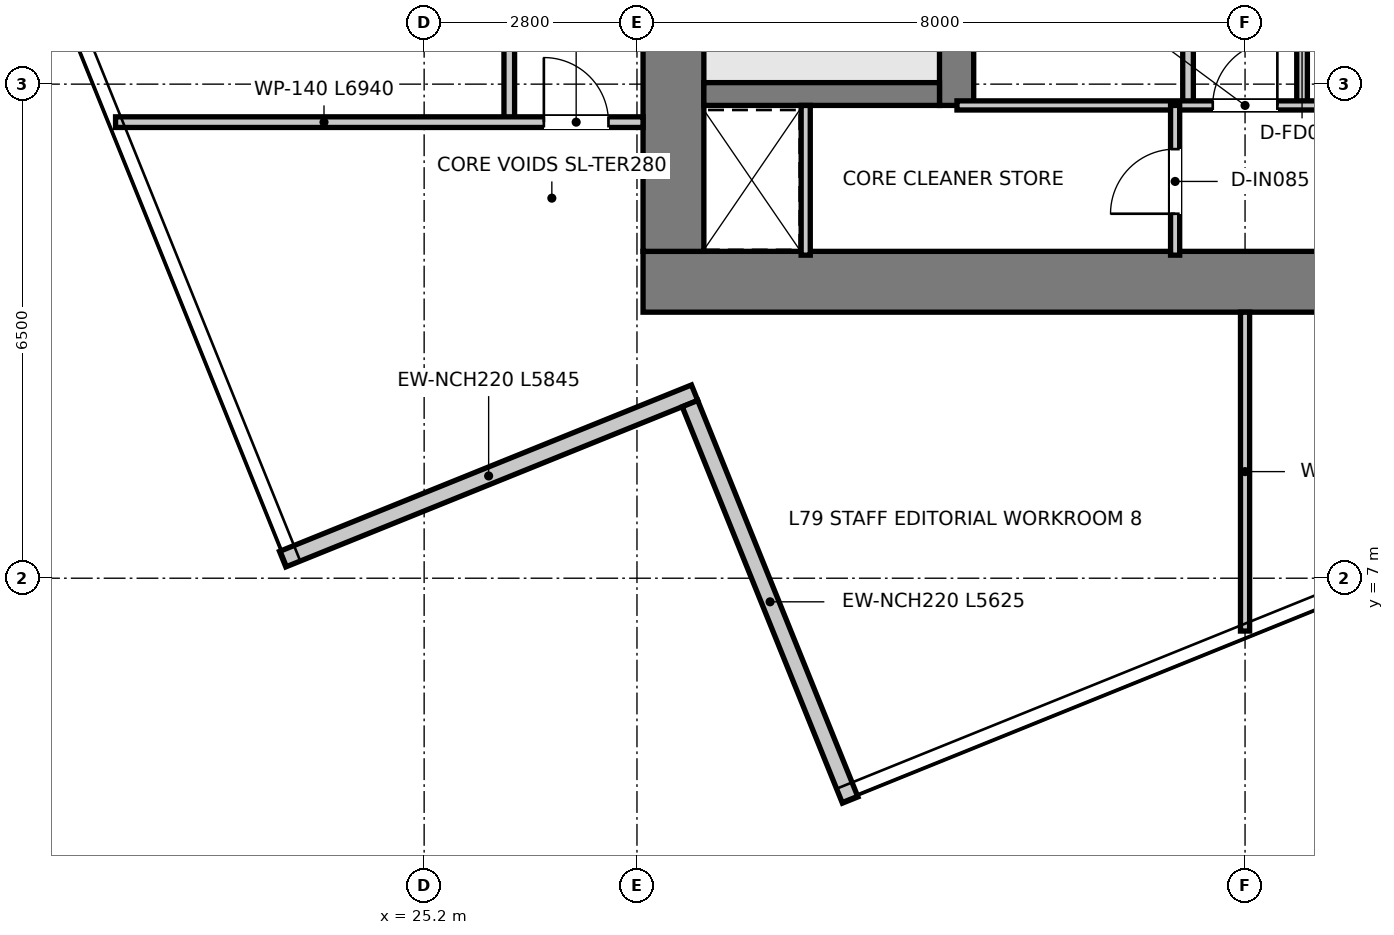
"""IFC4 building model, lengths in metres.
Left out: names, types, materials, properties, quantities, classifications, styles, units other than length and angle.
Written with IfcOpenShell. Run it as: python <this file> out.ifc"""

import sys

from ifc_helpers import new_model, si_unit, direction, frame, frame_2d, origin, place, context, subcontext, project, spatial, rectangle, extrude, element, fill, save


model = new_model("IFC4")
c1 = context("Model", 3, precision=1e-05, world=origin(), true_north=direction((0.0, 1.0)))
c2 = subcontext(c1, "Body", "Model", "MODEL_VIEW")
j1 = project(units=[si_unit("LENGTHUNIT", "METRE"), si_unit("PLANEANGLEUNIT", "RADIAN")], contexts=[c1])
p1 = place(None, origin())
s1 = spatial("IfcSite", under=j1, at=p1, CompositionType="ELEMENT")
p2 = place(p1, origin())
s2 = spatial("IfcBuilding", under=s1, at=p2, CompositionType="ELEMENT")
p3 = place(p2, frame((0.0, 0.0, 323.75)))
s3 = spatial("IfcBuildingStorey", under=s2, at=p3, CompositionType="ELEMENT", Elevation=323.75)
p4 = place(p3, frame((28.08, 10.9, 0.0), z_axis=(0.0, 0.0, 1.0), x_axis=(1.0, 0.0, 0.0)))
e1 = element("IfcWall", 1, at=p4, inside=s3, PredefinedType="SHEAR", context=c2, shape_type="SweptSolid", body=[
    extrude(rectangle(XDim=15.84, YDim=0.8, at=frame_2d((7.92, 0.0))), origin(), (0.0, 0.0, 1.0), 3.95),
])
p5 = place(p3, frame((28.48, 11.3, 0.0), z_axis=(0.0, 0.0, 1.0), x_axis=(0.0, 1.0, 0.0)))
e2 = element("IfcWall", 2, at=p5, inside=s3, PredefinedType="SHEAR", context=c2, shape_type="SweptSolid", body=[
    extrude(rectangle(XDim=14.7, YDim=0.8, at=frame_2d((7.35, 0.0))), origin(), (0.0, 0.0, 1.0), 3.95),
])
p6 = place(p3, frame((32.205, 13.22, 0.0), z_axis=(0.0, 0.0, 1.0), x_axis=(0.0, 1.0, 0.0)))
e3 = element("IfcWall", 3, at=p6, inside=s3, PredefinedType="SHEAR", context=c2, shape_type="SweptSolid", body=[
    extrude(rectangle(XDim=12.78, YDim=0.45, at=frame_2d((6.39, 0.0))), origin(), (0.0, 0.0, 1.0), 3.95),
])
p7 = place(p6, frame((10.58, 0.0, 0.0)))
e4 = element("IfcOpeningElement", 4, at=p7, cuts=e3, PredefinedType="OPENING", context=c2, shape_type="SweptSolid", body=[
    extrude(rectangle(XDim=1.1, YDim=2.15, at=frame_2d((0.55, 1.075))), frame((0.0, 0.235, 0.0), z_axis=(0.0, -1.0, 0.0), x_axis=(1.0, 0.0, 0.0)), (0.0, 0.0, 1.0), 0.47),
])
p8 = place(p3, frame((28.88, 13.37, 0.0), z_axis=(0.0, 0.0, 1.0), x_axis=(1.0, 0.0, 0.0)))
e5 = element("IfcWall", 5, at=p8, inside=s3, PredefinedType="SHEAR", context=c2, shape_type="SweptSolid", body=[
    extrude(rectangle(XDim=3.1, YDim=0.3, at=frame_2d((1.55, 0.0))), origin(), (0.0, 0.0, 1.0), 3.95),
])
p9 = place(p3, frame((23.339, 7.251, 0.0), z_axis=(0.0, 0.0, 1.0), x_axis=(0.927177676614, 0.374621884023, 0.0)))
e6 = element("IfcWall", 6, at=p9, inside=s3, PredefinedType="ELEMENTEDWALL", context=c2, shape_type="SweptSolid", body=[
    extrude(rectangle(XDim=5.845, YDim=0.22, at=frame_2d((2.922, 0.0))), origin(), (0.0, 0.0, 1.0), 3.67),
])
p10 = place(p3, frame((28.698, 9.297, 0.0), z_axis=(0.0, 0.0, 1.0), x_axis=(0.374613748588, -0.927180963658, 0.0)))
e7 = element("IfcWall", 7, at=p10, inside=s3, PredefinedType="ELEMENTEDWALL", context=c2, shape_type="SweptSolid", body=[
    extrude(rectangle(XDim=5.625, YDim=0.22, at=frame_2d((2.812, 0.0))), origin(), (0.0, 0.0, 1.0), 3.67),
])
p11 = place(p3, frame((35.25, 13.22, 0.0), z_axis=(0.0, 0.0, 1.0), x_axis=(0.0, 1.0, 0.0)))
e8 = element("IfcWall", 8, at=p11, inside=s3, PredefinedType="PARTITIONING", context=c2, shape_type="SweptSolid", body=[
    extrude(rectangle(XDim=4.56, YDim=0.14, at=frame_2d((2.28, 0.0))), origin(), (0.0, 0.0, 1.0), 3.67),
])
p12 = place(p11, frame((1.93, 0.0, 0.0)))
e9 = element("IfcOpeningElement", 9, at=p12, cuts=e8, PredefinedType="OPENING", context=c2, shape_type="SweptSolid", body=[
    extrude(rectangle(XDim=0.9, YDim=2.1, at=frame_2d((0.45, 1.05))), frame((0.0, 0.08, 0.0), z_axis=(0.0, -1.0, 0.0), x_axis=(1.0, 0.0, 0.0)), (0.0, 0.0, 1.0), 0.16),
])
p13 = place(p3, frame((36.75, 13.22, 0.0), z_axis=(0.0, 0.0, 1.0), x_axis=(0.0, 1.0, 0.0)))
e10 = element("IfcWall", 10, at=p13, inside=s3, PredefinedType="PARTITIONING", context=c2, shape_type="SweptSolid", body=[
    extrude(rectangle(XDim=4.56, YDim=0.14, at=frame_2d((2.28, 0.0))), origin(), (0.0, 0.0, 1.0), 3.67),
])
p14 = place(p13, frame((1.93, 0.0, 0.0)))
e11 = element("IfcOpeningElement", 11, at=p14, cuts=e10, PredefinedType="OPENING", context=c2, shape_type="SweptSolid", body=[
    extrude(rectangle(XDim=0.9, YDim=2.1, at=frame_2d((0.45, 1.05))), frame((0.0, 0.08, 0.0), z_axis=(0.0, -1.0, 0.0), x_axis=(1.0, 0.0, 0.0)), (0.0, 0.0, 1.0), 0.16),
])
p15 = place(p3, frame((30.22, 11.25, 0.0), z_axis=(0.0, 0.0, 1.0), x_axis=(0.0, 1.0, 0.0)))
e12 = element("IfcWall", 12, at=p15, inside=s3, PredefinedType="PARTITIONING", context=c2, shape_type="SweptSolid", body=[
    extrude(rectangle(XDim=1.97, YDim=0.12, at=frame_2d((0.985, 0.0))), origin(), (0.0, 0.0, 1.0), 3.67),
])
p16 = place(p3, frame((32.21, 13.22, 0.0), z_axis=(0.0, 0.0, 1.0), x_axis=(1.0, 0.0, 0.0)))
e13 = element("IfcWall", 13, at=p16, inside=s3, PredefinedType="PARTITIONING", context=c2, shape_type="SweptSolid", body=[
    extrude(rectangle(XDim=7.58, YDim=0.12, at=frame_2d((3.79, 0.0))), origin(), (0.0, 0.0, 1.0), 3.67),
])
p17 = place(p16, frame((3.365, 0.0, 0.0)))
e14 = element("IfcOpeningElement", 14, at=p17, cuts=e13, PredefinedType="OPENING", context=c2, shape_type="SweptSolid", body=[
    extrude(rectangle(XDim=0.85, YDim=2.1, at=frame_2d((0.425, 1.05))), frame((0.0, 0.07, 0.0), z_axis=(0.0, -1.0, 0.0), x_axis=(1.0, 0.0, 0.0)), (0.0, 0.0, 1.0), 0.14),
])
p18 = place(p3, frame((35.08, 11.25, 0.0), z_axis=(0.0, 0.0, 1.0), x_axis=(0.0, 1.0, 0.0)))
e15 = element("IfcWall", 15, at=p18, inside=s3, PredefinedType="PARTITIONING", context=c2, shape_type="SweptSolid", body=[
    extrude(rectangle(XDim=1.97, YDim=0.12, at=frame_2d((0.985, 0.0))), origin(), (0.0, 0.0, 1.0), 3.67),
])
p19 = place(p18, frame((0.545, 0.0, 0.0)))
e16 = element("IfcOpeningElement", 16, at=p19, cuts=e15, PredefinedType="OPENING", context=c2, shape_type="SweptSolid", body=[
    extrude(rectangle(XDim=0.85, YDim=2.1, at=frame_2d((0.425, 1.05))), frame((0.0, 0.07, 0.0), z_axis=(0.0, -1.0, 0.0), x_axis=(1.0, 0.0, 0.0)), (0.0, 0.0, 1.0), 0.14),
])
p20 = place(p3, frame((26.32, 13.0, 0.0), z_axis=(0.0, 0.0, 1.0), x_axis=(0.0, 1.0, 0.0)))
e17 = element("IfcWall", 17, at=p20, inside=s3, PredefinedType="PARTITIONING", context=c2, shape_type="SweptSolid", body=[
    extrude(rectangle(XDim=15.66, YDim=0.14, at=frame_2d((7.83, 0.0))), origin(), (0.0, 0.0, 1.0), 3.13),
])
p21 = place(p20, frame((14.3, 0.0, 0.0)))
e18 = element("IfcOpeningElement", 18, at=p21, cuts=e17, PredefinedType="OPENING", context=c2, shape_type="SweptSolid", body=[
    extrude(rectangle(XDim=0.9, YDim=2.1, at=frame_2d((0.45, 1.05))), frame((0.0, 0.08, 0.0), z_axis=(0.0, -1.0, 0.0), x_axis=(1.0, 0.0, 0.0)), (0.0, 0.0, 1.0), 0.16),
])
p22 = place(p20, frame((8.71, 0.0, 0.0)))
e19 = element("IfcOpeningElement", 19, at=p22, cuts=e17, PredefinedType="OPENING", context=c2, shape_type="SweptSolid", body=[
    extrude(rectangle(XDim=0.9, YDim=2.1, at=frame_2d((0.45, 1.05))), frame((0.0, 0.08, 0.0), z_axis=(0.0, -1.0, 0.0), x_axis=(1.0, 0.0, 0.0)), (0.0, 0.0, 1.0), 0.16),
])
p23 = place(p3, frame((21.14, 13.0, 0.0), z_axis=(0.0, 0.0, 1.0), x_axis=(1.0, 0.0, 0.0)))
e20 = element("IfcWall", 20, at=p23, inside=s3, PredefinedType="PARTITIONING", context=c2, shape_type="SweptSolid", body=[
    extrude(rectangle(XDim=6.94, YDim=0.14, at=frame_2d((3.47, 0.0))), origin(), (0.0, 0.0, 1.0), 3.18),
])
p24 = place(p23, frame((5.635, 0.0, 0.0)))
e21 = element("IfcOpeningElement", 21, at=p24, cuts=e20, PredefinedType="OPENING", context=c2, shape_type="SweptSolid", body=[
    extrude(rectangle(XDim=0.85, YDim=2.1, at=frame_2d((0.425, 1.05))), frame((0.0, 0.08, 0.0), z_axis=(0.0, -1.0, 0.0), x_axis=(1.0, 0.0, 0.0)), (0.0, 0.0, 1.0), 0.16),
])
p25 = place(p3, frame((36.0, 6.305, 0.0), z_axis=(0.0, 0.0, 1.0), x_axis=(0.0, 1.0, 0.0)))
e22 = element("IfcWall", 22, at=p25, inside=s3, PredefinedType="PARTITIONING", context=c2, shape_type="SweptSolid", body=[
    extrude(rectangle(XDim=4.195, YDim=0.12, at=frame_2d((2.098, 0.0))), origin(), (0.0, 0.0, 1.0), 3.67),
])
p26 = place(p17, origin())
e23 = element("IfcDoor", 23, at=p26, inside=s3, OperationType="SINGLE_SWING_RIGHT", PredefinedType="DOOR", context=c2, shape_type="SweptSolid", body=[
    extrude(rectangle(XDim=0.85, YDim=2.1, at=frame_2d((0.425, 1.05))), frame((0.0, 0.025, 0.0), z_axis=(0.0, -1.0, 0.0), x_axis=(1.0, 0.0, 0.0)), (0.0, 0.0, 1.0), 0.05),
])
fill(e14, e23)
p27 = place(p19, origin())
e24 = element("IfcDoor", 24, at=p27, inside=s3, OperationType="SINGLE_SWING_LEFT", PredefinedType="DOOR", context=c2, shape_type="SweptSolid", body=[
    extrude(rectangle(XDim=0.85, YDim=2.1, at=frame_2d((0.425, 1.05))), frame((0.0, 0.025, 0.0), z_axis=(0.0, -1.0, 0.0), x_axis=(1.0, 0.0, 0.0)), (0.0, 0.0, 1.0), 0.05),
])
fill(e16, e24)
p28 = place(p24, origin())
e25 = element("IfcDoor", 25, at=p28, inside=s3, OperationType="SINGLE_SWING_LEFT", PredefinedType="DOOR", context=c2, shape_type="SweptSolid", body=[
    extrude(rectangle(XDim=0.85, YDim=2.1, at=frame_2d((0.425, 1.05))), frame((0.0, 0.025, 0.0), z_axis=(0.0, -1.0, 0.0), x_axis=(1.0, 0.0, 0.0)), (0.0, 0.0, 1.0), 0.05),
])
fill(e21, e25)
save(model, sys.argv[1])
